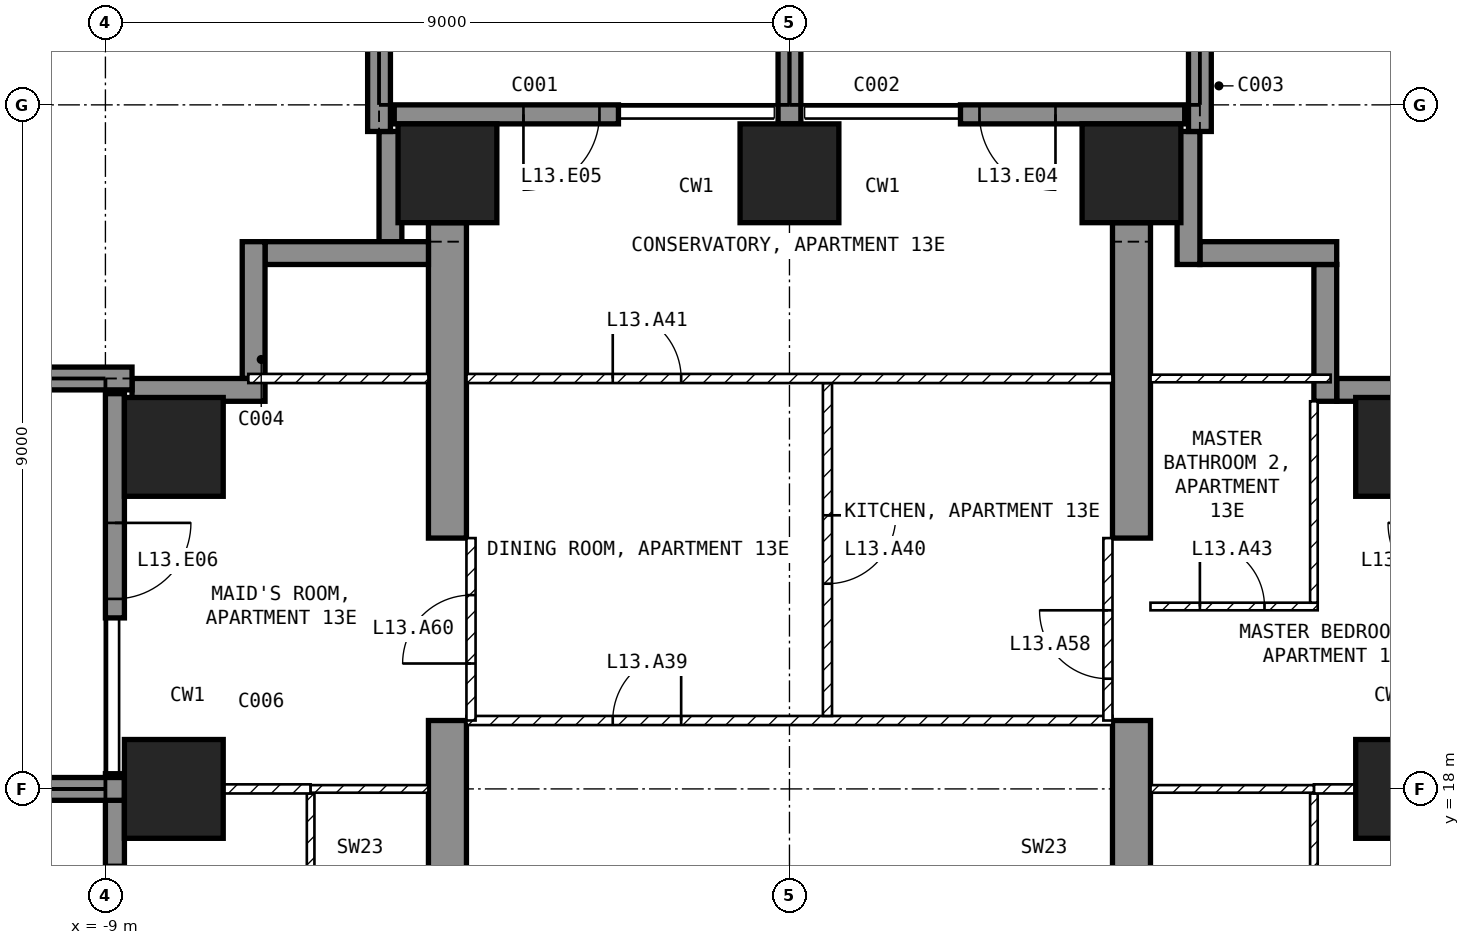
"""IFC4 building model, lengths in metres.
Left out: names, types, materials, properties, quantities, classifications, styles, units other than length and angle.
Written with IfcOpenShell. Run it as: python <this file> out.ifc"""

import sys

from ifc_helpers import new_model, si_unit, direction, frame, frame_2d, origin, origin_2d, place, context, subcontext, project, spatial, polyline, rectangle, outline, extrude, element, fill, save


model = new_model("IFC4")
c1 = context("Model", 3, precision=1e-05, world=origin(), true_north=direction((0.0, 1.0)))
c2 = subcontext(c1, "Body", "Model", "MODEL_VIEW")
j1 = project(units=[si_unit("LENGTHUNIT", "METRE"), si_unit("PLANEANGLEUNIT", "RADIAN")], contexts=[c1])
p1 = place(None, origin())
s1 = spatial("IfcSite", under=j1, at=p1, CompositionType="ELEMENT")
p2 = place(p1, origin())
s2 = spatial("IfcBuilding", under=s1, at=p2, CompositionType="ELEMENT")
p3 = place(p2, frame((0.0, 0.0, 64.5)))
s3 = spatial("IfcBuildingStorey", under=s2, at=p3, CompositionType="ELEMENT", Elevation=64.5)
for number, where, z_axis, x_axis in (
    (1, (-8.1, 18.0, -0.25), (0.0, 0.0, 1.0), (1.0, 0.0, 0.0)),
    (2, (-8.1, 22.5, -0.25), (0.0, 0.0, 1.0), (1.0, 0.0, 0.0)),
    (3, (-4.5, 26.1, -0.25), (0.0, 0.0, 1.0), (1.0, 0.0, 0.0)),
    (4, (0.0, 26.1, -0.25), (0.0, 0.0, 1.0), (1.0, 0.0, 0.0)),
    (5, (4.5, 26.1, -0.25), (0.0, 0.0, 1.0), (1.0, 0.0, 0.0)),
    (6, (8.1, 18.0, -0.25), (0.0, 0.0, 1.0), (1.0, 0.0, 0.0)),
    (7, (8.1, 22.5, -0.25), (0.0, 0.0, 1.0), (1.0, 0.0, 0.0)),
):
    element("IfcColumn", number, at=place(p3, frame(where, z_axis=z_axis, x_axis=x_axis)), inside=s3, PredefinedType="COLUMN", context=c2, shape_type="SweptSolid", body=[
        extrude(rectangle(XDim=1.3, YDim=1.3, at=origin_2d()), origin(), (0.0, 0.0, 1.0), 3.5),
    ])
for number, where, z_axis, x_axis in (
    (8, (-4.75, 9.0, -0.25), (1.0, 0.0, 0.0), (0.0, 1.0, 0.0)),
    (9, (4.25, 9.0, -0.25), (1.0, 0.0, 0.0), (0.0, 1.0, 0.0)),
):
    element("IfcWall", number, at=place(p3, frame(where, z_axis=z_axis, x_axis=x_axis)), inside=s3, PredefinedType="SHEAR", context=c2, shape_type="SweptSolid", body=[
        extrude(outline(polyline([(0.0, 0.0), (2.1, 0.0), (2.1, 2.65), (4.5, 2.65), (4.5, 0.0), (9.9, 0.0), (9.9, 2.65), (12.3, 2.65), (12.3, 0.0), (16.45, 0.0), (16.45, 3.5), (0.0, 3.5), (0.0, 0.0)])), origin(), (0.0, 0.0, 1.0), 0.5),
    ])
p4 = place(p3, frame((5.2, 26.875, 0.0), z_axis=(0.0, 0.0, 1.0), x_axis=(-1.0, 0.0, 0.0)))
e10 = element("IfcWall", 10, at=p4, inside=s3, PredefinedType="SOLIDWALL", context=c2, shape_type="SweptSolid", body=[
    extrude(rectangle(XDim=2.95, YDim=0.25, at=frame_2d((1.475, 0.0))), origin(), (0.0, 0.0, 1.0), 3.25),
])
p5 = place(p4, frame((1.7, 0.0, 0.0)))
e11 = element("IfcOpeningElement", 11, at=p5, cuts=e10, PredefinedType="OPENING", context=c2, shape_type="SweptSolid", body=[
    extrude(rectangle(XDim=1.0, YDim=2.4, at=frame_2d((0.5, 1.2))), frame((0.0, 0.135, 0.0), z_axis=(0.0, -1.0, 0.0), x_axis=(1.0, 0.0, 0.0)), (0.0, 0.0, 1.0), 0.27),
])
p6 = place(p3, frame((-2.25, 26.875, 0.0), z_axis=(0.0, 0.0, 1.0), x_axis=(-1.0, 0.0, 0.0)))
e12 = element("IfcWall", 12, at=p6, inside=s3, PredefinedType="SOLIDWALL", context=c2, shape_type="SweptSolid", body=[
    extrude(rectangle(XDim=2.95, YDim=0.25, at=frame_2d((1.475, 0.0))), origin(), (0.0, 0.0, 1.0), 3.25),
])
p7 = place(p6, frame((0.25, 0.0, 0.0)))
e13 = element("IfcOpeningElement", 13, at=p7, cuts=e12, PredefinedType="OPENING", context=c2, shape_type="SweptSolid", body=[
    extrude(rectangle(XDim=1.0, YDim=2.4, at=frame_2d((0.5, 1.2))), frame((0.0, 0.135, 0.0), z_axis=(0.0, -1.0, 0.0), x_axis=(1.0, 0.0, 0.0)), (0.0, 0.0, 1.0), 0.27),
])
p8 = place(p3, frame((-8.875, 23.2, 0.0), z_axis=(0.0, 0.0, 1.0), x_axis=(0.0, -1.0, 0.0)))
e14 = element("IfcWall", 14, at=p8, inside=s3, PredefinedType="SOLIDWALL", context=c2, shape_type="SweptSolid", body=[
    extrude(rectangle(XDim=2.95, YDim=0.25, at=frame_2d((1.475, 0.0))), origin(), (0.0, 0.0, 1.0), 3.25),
])
p9 = place(p8, frame((1.7, 0.0, 0.0)))
e15 = element("IfcOpeningElement", 15, at=p9, cuts=e14, PredefinedType="OPENING", context=c2, shape_type="SweptSolid", body=[
    extrude(rectangle(XDim=1.0, YDim=2.4, at=frame_2d((0.5, 1.2))), frame((0.0, 0.135, 0.0), z_axis=(0.0, -1.0, 0.0), x_axis=(1.0, 0.0, 0.0)), (0.0, 0.0, 1.0), 0.27),
])
p10 = place(p3, frame((-8.875, 18.2, 0.0), z_axis=(0.0, 0.0, 1.0), x_axis=(0.0, -1.0, 0.0)))
e16 = element("IfcWall", 16, at=p10, inside=s3, PredefinedType="SOLIDWALL", context=c2, shape_type="SweptSolid", body=[
    extrude(rectangle(XDim=2.65, YDim=0.25, at=frame_2d((1.325, 0.0))), origin(), (0.0, 0.0, 1.0), 3.25),
])
p11 = place(p10, frame((1.2, 0.0, 0.0)))
e17 = element("IfcOpeningElement", 17, at=p11, cuts=e16, PredefinedType="OPENING", context=c2, shape_type="SweptSolid", body=[
    extrude(rectangle(XDim=1.2, YDim=2.4, at=frame_2d((0.6, 1.2))), frame((0.0, 0.135, 0.0), z_axis=(0.0, -1.0, 0.0), x_axis=(1.0, 0.0, 0.0)), (0.0, 0.0, 1.0), 0.27),
])
p12 = place(p3, frame((8.65, 23.25, 0.0), z_axis=(0.0, 0.0, 1.0), x_axis=(-1.0, 0.0, 0.0)))
e18 = element("IfcWall", 18, at=p12, inside=s3, PredefinedType="SOLIDWALL", context=c2, shape_type="SweptSolid", body=[
    extrude(rectangle(XDim=1.45, YDim=0.3, at=frame_2d((0.725, 0.0))), origin(), (0.0, 0.0, 1.0), 3.25),
])
p13 = place(p3, frame((7.05, 23.1, 0.0), z_axis=(0.0, 0.0, 1.0), x_axis=(0.0, 1.0, 0.0)))
e19 = element("IfcWall", 19, at=p13, inside=s3, PredefinedType="SOLIDWALL", context=c2, shape_type="SweptSolid", body=[
    extrude(rectangle(XDim=1.8, YDim=0.3, at=frame_2d((0.9, 0.0))), origin(), (0.0, 0.0, 1.0), 3.25),
])
p14 = place(p3, frame((7.2, 25.05, 0.0), z_axis=(0.0, 0.0, 1.0), x_axis=(-1.0, 0.0, 0.0)))
e20 = element("IfcWall", 20, at=p14, inside=s3, PredefinedType="SOLIDWALL", context=c2, shape_type="SweptSolid", body=[
    extrude(rectangle(XDim=1.8, YDim=0.3, at=frame_2d((0.9, 0.0))), origin(), (0.0, 0.0, 1.0), 3.25),
])
p15 = place(p3, frame((5.25, 24.9, 0.0), z_axis=(0.0, 0.0, 1.0), x_axis=(0.0, 1.0, 0.0)))
e21 = element("IfcWall", 21, at=p15, inside=s3, PredefinedType="SOLIDWALL", context=c2, shape_type="SweptSolid", body=[
    extrude(rectangle(XDim=1.75, YDim=0.3, at=frame_2d((0.875, 0.0))), origin(), (0.0, 0.0, 1.0), 3.25),
])
p16 = place(p3, frame((-5.25, 26.65, 0.0), z_axis=(0.0, 0.0, 1.0), x_axis=(0.0, -1.0, 0.0)))
e22 = element("IfcWall", 22, at=p16, inside=s3, PredefinedType="SOLIDWALL", context=c2, shape_type="SweptSolid", body=[
    extrude(rectangle(XDim=1.45, YDim=0.3, at=frame_2d((0.725, 0.0))), origin(), (0.0, 0.0, 1.0), 3.25),
])
p17 = place(p3, frame((-4.75, 25.05, 0.0), z_axis=(0.0, 0.0, 1.0), x_axis=(-1.0, 0.0, 0.0)))
e23 = element("IfcWall", 23, at=p17, inside=s3, PredefinedType="SOLIDWALL", context=c2, shape_type="SweptSolid", body=[
    extrude(rectangle(XDim=2.15, YDim=0.3, at=frame_2d((1.075, 0.0))), origin(), (0.0, 0.0, 1.0), 3.25),
])
p18 = place(p3, frame((-7.05, 25.2, 0.0), z_axis=(0.0, 0.0, 1.0), x_axis=(0.0, -1.0, 0.0)))
e24 = element("IfcWall", 24, at=p18, inside=s3, PredefinedType="SOLIDWALL", context=c2, shape_type="SweptSolid", body=[
    extrude(rectangle(XDim=1.8, YDim=0.3, at=frame_2d((0.9, 0.0))), origin(), (0.0, 0.0, 1.0), 3.25),
])
p19 = place(p3, frame((-6.9, 23.25, 0.0), z_axis=(0.0, 0.0, 1.0), x_axis=(-1.0, 0.0, 0.0)))
e25 = element("IfcWall", 25, at=p19, inside=s3, PredefinedType="SOLIDWALL", context=c2, shape_type="SweptSolid", body=[
    extrude(rectangle(XDim=1.75, YDim=0.3, at=frame_2d((0.875, 0.0))), origin(), (0.0, 0.0, 1.0), 3.25),
])
p20 = place(p3, frame((-8.75, 18.0, 0.0), z_axis=(0.0, 0.0, 1.0), x_axis=(-1.0, 0.0, 0.0)))
e26 = element("IfcWall", 26, at=p20, inside=s3, PredefinedType="SOLIDWALL", context=c2, shape_type="SweptSolid", body=[
    extrude(rectangle(XDim=2.95, YDim=0.3, at=frame_2d((1.475, 0.0))), origin(), (0.0, 0.0, 1.0), 3.25),
])
for number, where, z_axis, x_axis in (
    (27, (-8.65, 23.4, 0.0), (0.0, 0.0, 1.0), (-1.0, 0.0, 0.0)),
    (28, (-5.4, 26.65, 0.0), (0.0, 0.0, 1.0), (0.0, 1.0, 0.0)),
):
    element("IfcWall", number, at=place(p3, frame(where, z_axis=z_axis, x_axis=x_axis)), inside=s3, PredefinedType="SOLIDWALL", context=c2, shape_type="SweptSolid", body=[
        extrude(rectangle(XDim=3.05, YDim=0.3, at=frame_2d((1.525, 0.0))), origin(), (0.0, 0.0, 1.0), 3.25),
    ])
p21 = place(p3, frame((0.0, 26.75, 0.0), z_axis=(0.0, 0.0, 1.0), x_axis=(0.0, 1.0, 0.0)))
e29 = element("IfcWall", 29, at=p21, inside=s3, PredefinedType="SOLIDWALL", context=c2, shape_type="SweptSolid", body=[
    extrude(rectangle(XDim=2.95, YDim=0.3, at=frame_2d((1.475, 0.0))), origin(), (0.0, 0.0, 1.0), 3.25),
])
p22 = place(p3, frame((5.4, 26.65, 0.0), z_axis=(0.0, 0.0, 1.0), x_axis=(0.0, 1.0, 0.0)))
e30 = element("IfcWall", 30, at=p22, inside=s3, PredefinedType="SOLIDWALL", context=c2, shape_type="SweptSolid", body=[
    extrude(rectangle(XDim=3.05, YDim=0.3, at=frame_2d((1.525, 0.0))), origin(), (0.0, 0.0, 1.0), 3.25),
])
p23 = place(p3, frame((-4.25, 18.9, 0.0), z_axis=(0.0, 0.0, 1.0), x_axis=(1.0, 0.0, 0.0)))
e31 = element("IfcWall", 31, at=p23, inside=s3, PredefinedType="PARTITIONING", context=c2, shape_type="SweptSolid", body=[
    extrude(rectangle(XDim=8.5, YDim=0.12, at=frame_2d((4.25, 0.0))), origin(), (0.0, 0.0, 1.0), 3.25),
])
p24 = place(p23, frame((1.925, 0.0, 0.0)))
e32 = element("IfcOpeningElement", 32, at=p24, cuts=e31, PredefinedType="OPENING", context=c2, shape_type="SweptSolid", body=[
    extrude(rectangle(XDim=0.9, YDim=2.1, at=frame_2d((0.45, 1.05))), frame((0.0, 0.07, 0.0), z_axis=(0.0, -1.0, 0.0), x_axis=(1.0, 0.0, 0.0)), (0.0, 0.0, 1.0), 0.14),
])
p25 = place(p3, frame((0.5, 23.34, 0.0), z_axis=(0.0, 0.0, 1.0), x_axis=(0.0, -1.0, 0.0)))
e33 = element("IfcWall", 33, at=p25, inside=s3, PredefinedType="PARTITIONING", context=c2, shape_type="SweptSolid", body=[
    extrude(rectangle(XDim=4.38, YDim=0.12, at=frame_2d((2.19, 0.0))), origin(), (0.0, 0.0, 1.0), 3.25),
])
p26 = place(p25, frame((1.74, 0.0, 0.0)))
e34 = element("IfcOpeningElement", 34, at=p26, cuts=e33, PredefinedType="OPENING", context=c2, shape_type="SweptSolid", body=[
    extrude(rectangle(XDim=0.9, YDim=2.1, at=frame_2d((0.45, 1.05))), frame((0.0, 0.07, 0.0), z_axis=(0.0, -1.0, 0.0), x_axis=(1.0, 0.0, 0.0)), (0.0, 0.0, 1.0), 0.14),
])
p27 = place(p3, frame((-4.25, 23.4, 0.0), z_axis=(0.0, 0.0, 1.0), x_axis=(1.0, 0.0, 0.0)))
e35 = element("IfcWall", 35, at=p27, inside=s3, PredefinedType="PARTITIONING", context=c2, shape_type="SweptSolid", body=[
    extrude(rectangle(XDim=8.5, YDim=0.12, at=frame_2d((4.25, 0.0))), origin(), (0.0, 0.0, 1.0), 3.25),
])
p28 = place(p27, frame((1.925, 0.0, 0.0)))
e36 = element("IfcOpeningElement", 36, at=p28, cuts=e35, PredefinedType="OPENING", context=c2, shape_type="SweptSolid", body=[
    extrude(rectangle(XDim=0.9, YDim=2.1, at=frame_2d((0.45, 1.05))), frame((0.0, 0.07, 0.0), z_axis=(0.0, -1.0, 0.0), x_axis=(1.0, 0.0, 0.0)), (0.0, 0.0, 1.0), 0.14),
])
p29 = place(p3, frame((6.9, 14.45, 0.0), z_axis=(0.0, 0.0, 1.0), x_axis=(0.0, 1.0, 0.0)))
e37 = element("IfcWall", 37, at=p29, inside=s3, PredefinedType="PARTITIONING", context=c2, shape_type="SweptSolid", body=[
    extrude(rectangle(XDim=3.49, YDim=0.1, at=frame_2d((1.745, 0.0))), origin(), (0.0, 0.0, 1.0), 3.25),
])
p30 = place(p3, frame((6.9, 18.0, 0.0), z_axis=(0.0, 0.0, 1.0), x_axis=(1.0, 0.0, 0.0)))
e38 = element("IfcWall", 38, at=p30, inside=s3, PredefinedType="PARTITIONING", context=c2, shape_type="SweptSolid", body=[
    extrude(rectangle(XDim=0.55, YDim=0.12, at=frame_2d((0.275, 0.0))), origin(), (0.0, 0.0, 1.0), 2.346),
])
p31 = place(p3, frame((4.75, 18.0, 0.0), z_axis=(0.0, 0.0, 1.0), x_axis=(1.0, 0.0, 0.0)))
e39 = element("IfcWall", 39, at=p31, inside=s3, PredefinedType="PARTITIONING", context=c2, shape_type="SweptSolid", body=[
    extrude(rectangle(XDim=2.15, YDim=0.1, at=frame_2d((1.075, 0.0))), origin(), (0.0, 0.0, 1.0), 2.346),
])
p32 = place(p3, frame((4.75, 20.4, 0.0), z_axis=(0.0, 0.0, 1.0), x_axis=(1.0, 0.0, 0.0)))
e40 = element("IfcWall", 40, at=p32, inside=s3, PredefinedType="PARTITIONING", context=c2, shape_type="SweptSolid", body=[
    extrude(rectangle(XDim=2.2, YDim=0.1, at=frame_2d((1.1, 0.0))), origin(), (0.0, 0.0, 1.0), 3.25),
])
p33 = place(p32, frame((0.65, 0.0, 0.0)))
e41 = element("IfcOpeningElement", 41, at=p33, cuts=e40, PredefinedType="OPENING", context=c2, shape_type="SweptSolid", body=[
    extrude(rectangle(XDim=0.85, YDim=2.1, at=frame_2d((0.425, 1.05))), frame((0.0, 0.06, 0.0), z_axis=(0.0, -1.0, 0.0), x_axis=(1.0, 0.0, 0.0)), (0.0, 0.0, 1.0), 0.12),
])
p34 = place(p3, frame((6.9, 20.45, 0.0), z_axis=(0.0, 0.0, 1.0), x_axis=(0.0, 1.0, 0.0)))
e42 = element("IfcWall", 42, at=p34, inside=s3, PredefinedType="PARTITIONING", context=c2, shape_type="SweptSolid", body=[
    extrude(rectangle(XDim=2.65, YDim=0.1, at=frame_2d((1.325, 0.0))), origin(), (0.0, 0.0, 1.0), 3.25),
])
p35 = place(p3, frame((4.75, 23.4, 0.0), z_axis=(0.0, 0.0, 1.0), x_axis=(1.0, 0.0, 0.0)))
e43 = element("IfcWall", 43, at=p35, inside=s3, PredefinedType="PARTITIONING", context=c2, shape_type="SweptSolid", body=[
    extrude(rectangle(XDim=2.37, YDim=0.1, at=frame_2d((1.185, 0.0))), origin(), (0.0, 0.0, 1.0), 3.25),
])
p36 = place(p3, frame((-6.3, 17.94, 0.0), z_axis=(0.0, 0.0, 1.0), x_axis=(0.0, -1.0, 0.0)))
e44 = element("IfcWall", 44, at=p36, inside=s3, PredefinedType="PARTITIONING", context=c2, shape_type="SweptSolid", body=[
    extrude(rectangle(XDim=3.49, YDim=0.1, at=frame_2d((1.745, 0.0))), origin(), (0.0, 0.0, 1.0), 3.25),
])
p37 = place(p36, frame((1.32, 0.0, 0.0)))
e45 = element("IfcOpeningElement", 45, at=p37, cuts=e44, PredefinedType="OPENING", context=c2, shape_type="SweptSolid", body=[
    extrude(rectangle(XDim=0.85, YDim=2.1, at=frame_2d((0.425, 1.05))), frame((0.0, 0.06, 0.0), z_axis=(0.0, -1.0, 0.0), x_axis=(1.0, 0.0, 0.0)), (0.0, 0.0, 1.0), 0.12),
])
p38 = place(p3, frame((-7.45, 18.0, 0.0), z_axis=(0.0, 0.0, 1.0), x_axis=(1.0, 0.0, 0.0)))
e46 = element("IfcWall", 46, at=p38, inside=s3, PredefinedType="PARTITIONING", context=c2, shape_type="SweptSolid", body=[
    extrude(rectangle(XDim=1.15, YDim=0.12, at=frame_2d((0.575, 0.0))), origin(), (0.0, 0.0, 1.0), 2.346),
])
p39 = place(p3, frame((-6.3, 18.0, 0.0), z_axis=(0.0, 0.0, 1.0), x_axis=(1.0, 0.0, 0.0)))
e47 = element("IfcWall", 47, at=p39, inside=s3, PredefinedType="PARTITIONING", context=c2, shape_type="SweptSolid", body=[
    extrude(rectangle(XDim=1.55, YDim=0.1, at=frame_2d((0.775, 0.0))), origin(), (0.0, 0.0, 1.0), 2.346),
])
p40 = place(p3, frame((-7.12, 23.4, 0.0), z_axis=(0.0, 0.0, 1.0), x_axis=(1.0, 0.0, 0.0)))
e48 = element("IfcWall", 48, at=p40, inside=s3, PredefinedType="PARTITIONING", context=c2, shape_type="SweptSolid", body=[
    extrude(rectangle(XDim=2.37, YDim=0.12, at=frame_2d((1.185, 0.0))), origin(), (0.0, 0.0, 1.0), 3.25),
])
p41 = place(p3, frame((4.19, 18.9, 0.0), z_axis=(0.0, 0.0, 1.0), x_axis=(0.0, 1.0, 0.0)))
e49 = element("IfcWall", 49, at=p41, inside=s3, PredefinedType="PARTITIONING", context=c2, shape_type="SweptSolid", body=[
    extrude(rectangle(XDim=2.4, YDim=0.12, at=frame_2d((1.2, 0.0))), origin(), (0.0, 0.0, 1.0), 2.4),
])
p42 = place(p41, frame((0.55, 0.0, 0.0)))
e50 = element("IfcOpeningElement", 50, at=p42, cuts=e49, PredefinedType="OPENING", context=c2, shape_type="SweptSolid", body=[
    extrude(rectangle(XDim=0.9, YDim=2.1, at=frame_2d((0.45, 1.05))), frame((0.0, 0.07, 0.0), z_axis=(0.0, -1.0, 0.0), x_axis=(1.0, 0.0, 0.0)), (0.0, 0.0, 1.0), 0.14),
])
p43 = place(p3, frame((-4.19, 18.9, 0.0), z_axis=(0.0, 0.0, 1.0), x_axis=(0.0, 1.0, 0.0)))
e51 = element("IfcWall", 51, at=p43, inside=s3, PredefinedType="PARTITIONING", context=c2, shape_type="SweptSolid", body=[
    extrude(rectangle(XDim=2.4, YDim=0.12, at=frame_2d((1.2, 0.0))), origin(), (0.0, 0.0, 1.0), 2.4),
])
p44 = place(p43, frame((0.75, 0.0, 0.0)))
e52 = element("IfcOpeningElement", 52, at=p44, cuts=e51, PredefinedType="OPENING", context=c2, shape_type="SweptSolid", body=[
    extrude(rectangle(XDim=0.9, YDim=2.1, at=frame_2d((0.45, 1.05))), frame((0.0, 0.07, 0.0), z_axis=(0.0, -1.0, 0.0), x_axis=(1.0, 0.0, 0.0)), (0.0, 0.0, 1.0), 0.14),
])
p45 = place(p5, origin())
e53 = element("IfcDoor", 53, at=p45, inside=s3, OperationType="SINGLE_SWING_LEFT", PredefinedType="DOOR", context=c2, shape_type="SweptSolid", body=[
    extrude(rectangle(XDim=1.0, YDim=2.4, at=frame_2d((0.5, 1.2))), frame((0.0, 0.025, 0.0), z_axis=(0.0, -1.0, 0.0), x_axis=(1.0, 0.0, 0.0)), (0.0, 0.0, 1.0), 0.05),
])
fill(e11, e53)
p46 = place(p7, origin())
e54 = element("IfcDoor", 54, at=p46, inside=s3, OperationType="SINGLE_SWING_RIGHT", PredefinedType="DOOR", context=c2, shape_type="SweptSolid", body=[
    extrude(rectangle(XDim=1.0, YDim=2.4, at=frame_2d((0.5, 1.2))), frame((0.0, 0.025, 0.0), z_axis=(0.0, -1.0, 0.0), x_axis=(1.0, 0.0, 0.0)), (0.0, 0.0, 1.0), 0.05),
])
fill(e13, e54)
p47 = place(p9, origin())
e55 = element("IfcDoor", 55, at=p47, inside=s3, OperationType="SINGLE_SWING_LEFT", PredefinedType="DOOR", context=c2, shape_type="SweptSolid", body=[
    extrude(rectangle(XDim=1.0, YDim=2.4, at=frame_2d((0.5, 1.2))), frame((0.0, 0.025, 0.0), z_axis=(0.0, -1.0, 0.0), x_axis=(1.0, 0.0, 0.0)), (0.0, 0.0, 1.0), 0.05),
])
fill(e15, e55)
p48 = place(p24, origin())
e56 = element("IfcDoor", 56, at=p48, inside=s3, OperationType="SINGLE_SWING_RIGHT", PredefinedType="DOOR", context=c2, shape_type="SweptSolid", body=[
    extrude(rectangle(XDim=0.9, YDim=2.1, at=frame_2d((0.45, 1.05))), frame((0.0, 0.025, 0.0), z_axis=(0.0, -1.0, 0.0), x_axis=(1.0, 0.0, 0.0)), (0.0, 0.0, 1.0), 0.05),
])
fill(e32, e56)
p49 = place(p26, origin())
e57 = element("IfcDoor", 57, at=p49, inside=s3, OperationType="SINGLE_SWING_LEFT", PredefinedType="DOOR", context=c2, shape_type="SweptSolid", body=[
    extrude(rectangle(XDim=0.9, YDim=2.1, at=frame_2d((0.45, 1.05))), frame((0.0, 0.025, 0.0), z_axis=(0.0, -1.0, 0.0), x_axis=(1.0, 0.0, 0.0)), (0.0, 0.0, 1.0), 0.05),
])
fill(e34, e57)
p50 = place(p28, origin())
e58 = element("IfcDoor", 58, at=p50, inside=s3, OperationType="SINGLE_SWING_LEFT", PredefinedType="DOOR", context=c2, shape_type="SweptSolid", body=[
    extrude(rectangle(XDim=0.9, YDim=2.1, at=frame_2d((0.45, 1.05))), frame((0.0, 0.025, 0.0), z_axis=(0.0, -1.0, 0.0), x_axis=(1.0, 0.0, 0.0)), (0.0, 0.0, 1.0), 0.05),
])
fill(e36, e58)
p51 = place(p33, origin())
e59 = element("IfcDoor", 59, at=p51, inside=s3, OperationType="SINGLE_SWING_LEFT", PredefinedType="DOOR", context=c2, shape_type="SweptSolid", body=[
    extrude(rectangle(XDim=0.85, YDim=2.1, at=frame_2d((0.425, 1.05))), frame((0.0, 0.025, 0.0), z_axis=(0.0, -1.0, 0.0), x_axis=(1.0, 0.0, 0.0)), (0.0, 0.0, 1.0), 0.05),
])
fill(e41, e59)
p52 = place(p42, origin())
e60 = element("IfcDoor", 60, at=p52, inside=s3, OperationType="SINGLE_SWING_RIGHT", PredefinedType="DOOR", context=c2, shape_type="SweptSolid", body=[
    extrude(rectangle(XDim=0.9, YDim=2.1, at=frame_2d((0.45, 1.05))), frame((0.0, 0.025, 0.0), z_axis=(0.0, -1.0, 0.0), x_axis=(1.0, 0.0, 0.0)), (0.0, 0.0, 1.0), 0.05),
])
fill(e50, e60)
p53 = place(p44, origin())
e61 = element("IfcDoor", 61, at=p53, inside=s3, OperationType="SINGLE_SWING_LEFT", PredefinedType="DOOR", context=c2, shape_type="SweptSolid", body=[
    extrude(rectangle(XDim=0.9, YDim=2.1, at=frame_2d((0.45, 1.05))), frame((0.0, 0.025, 0.0), z_axis=(0.0, -1.0, 0.0), x_axis=(1.0, 0.0, 0.0)), (0.0, 0.0, 1.0), 0.05),
])
fill(e52, e61)
save(model, sys.argv[1])
